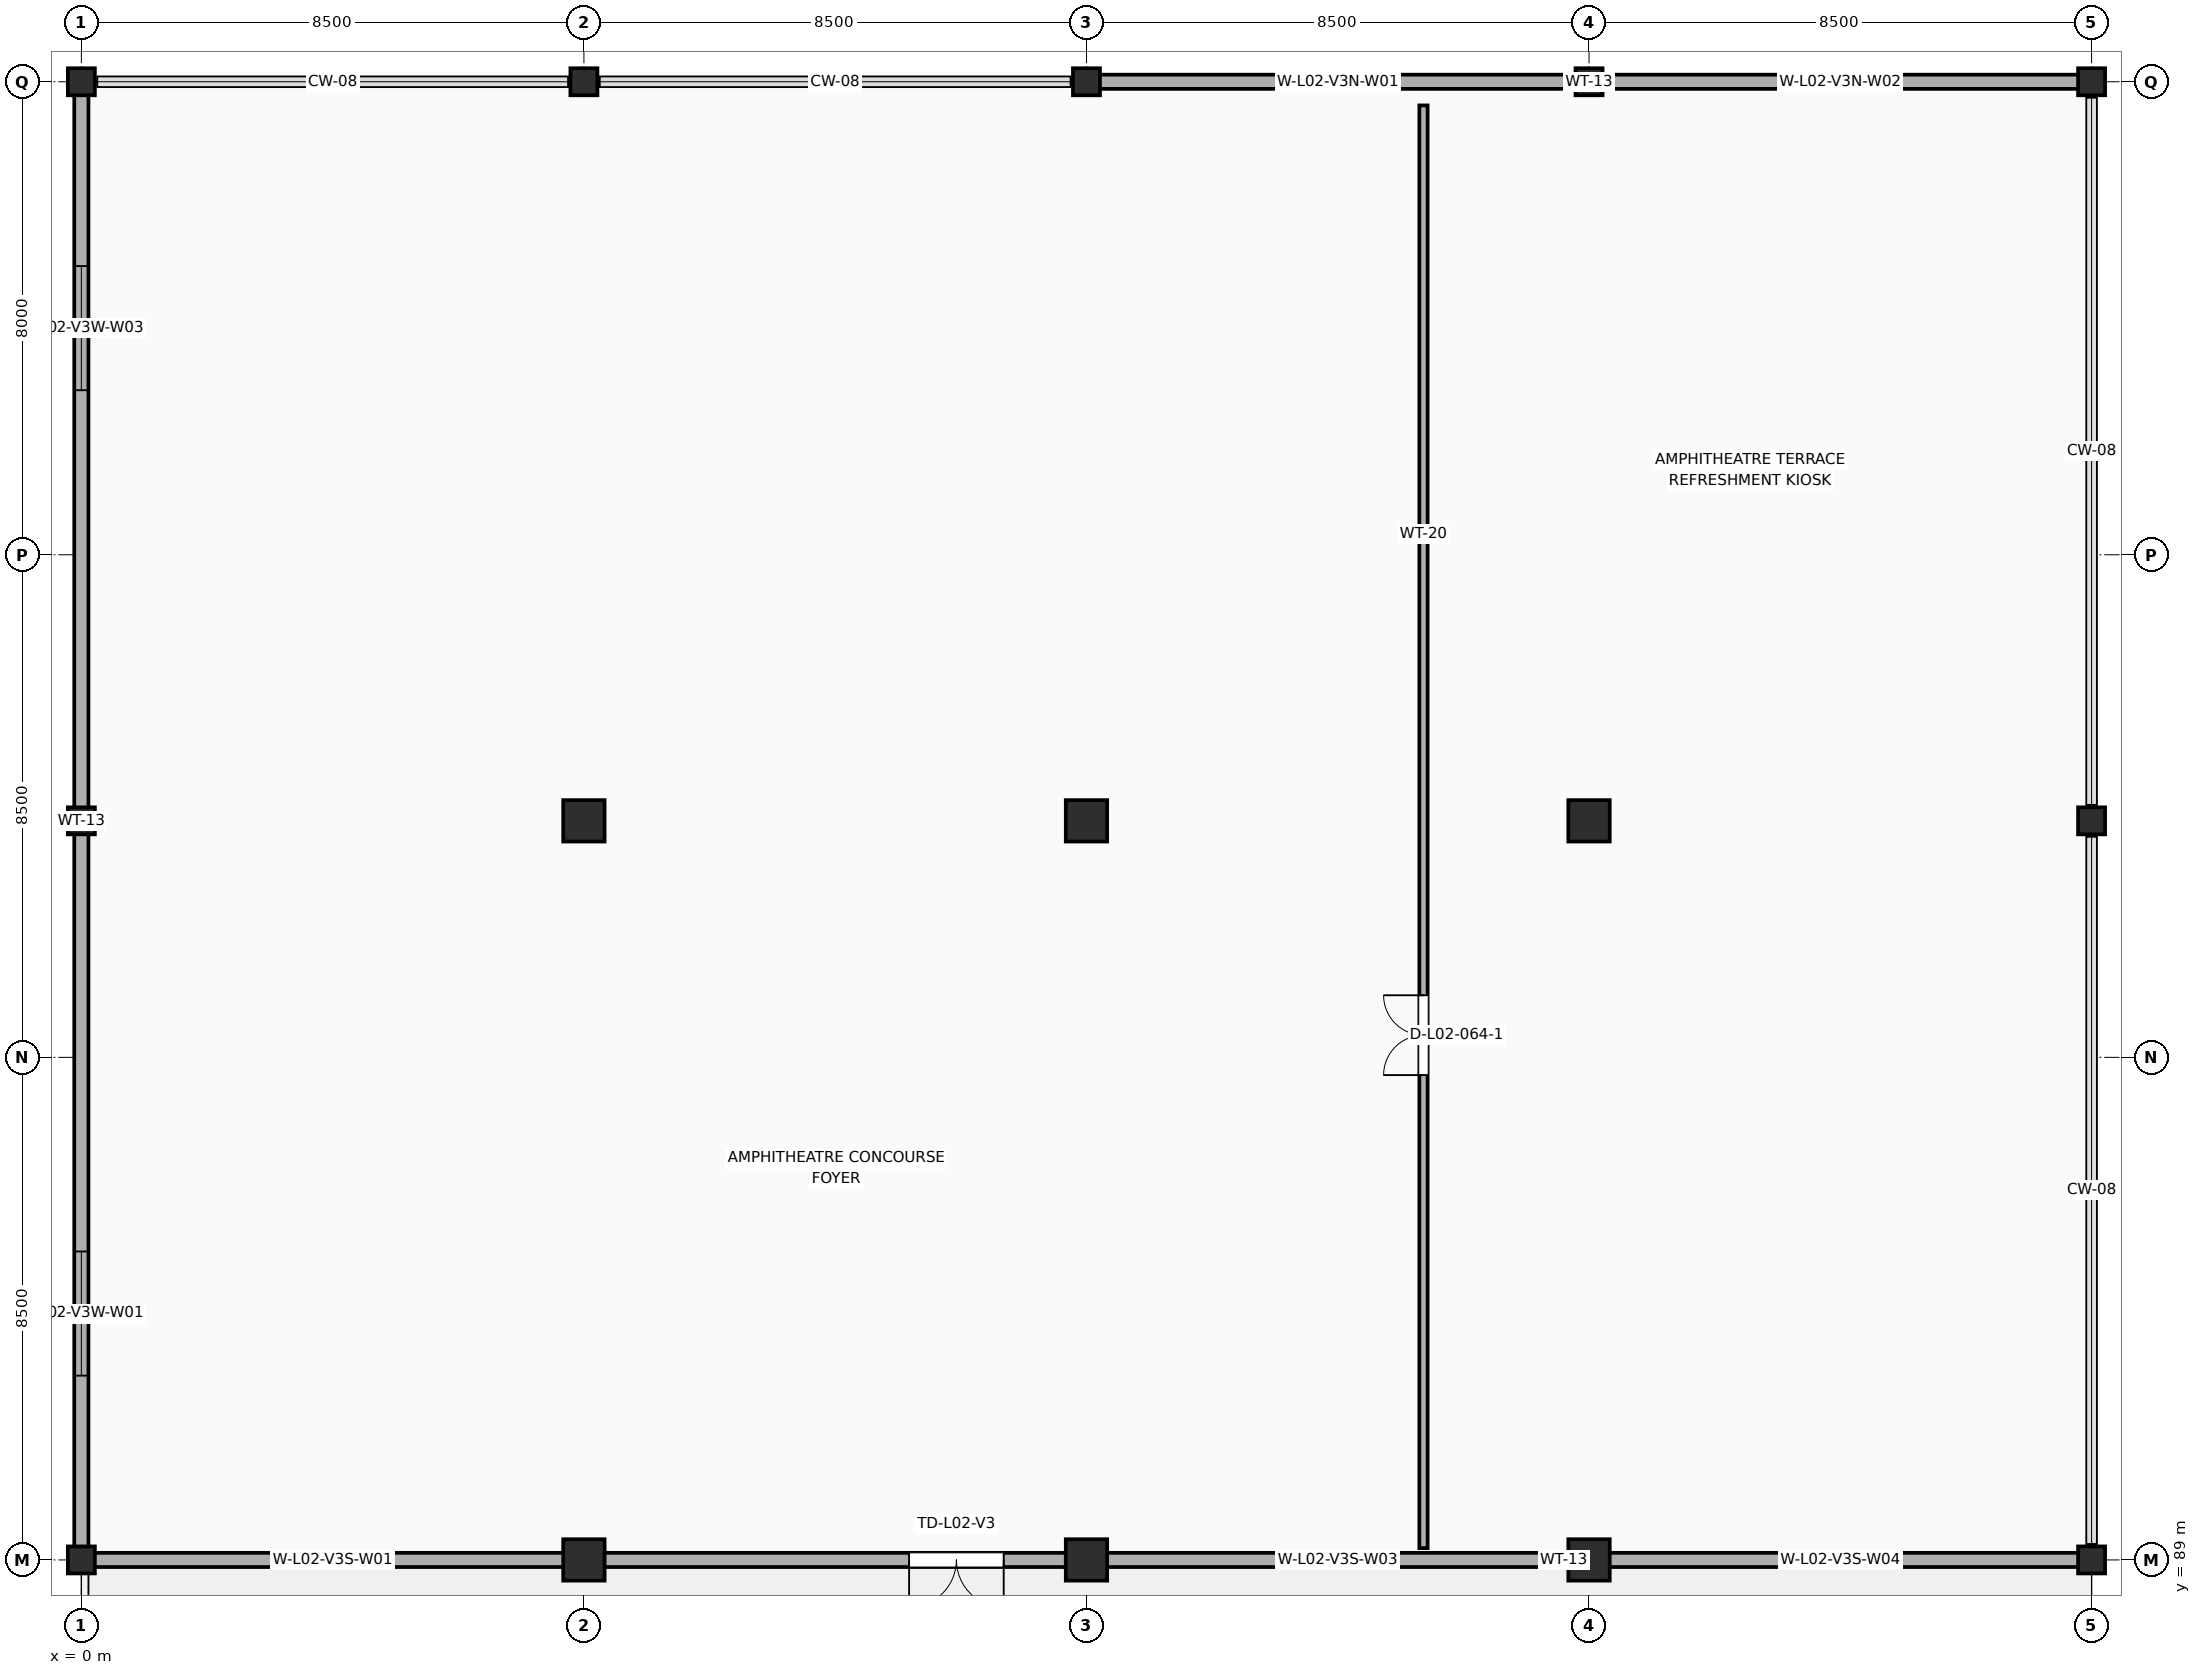
"""IFC4 building model, lengths in metres.
Left out: names, types, materials, properties, quantities, classifications, styles, units other than length and angle.
Written with IfcOpenShell. Run it as: python <this file> out.ifc"""

import sys

from ifc_helpers import new_model, si_unit, direction, frame, frame_2d, origin, origin_2d, place, context, subcontext, project, spatial, rectangle, hollow_circle, extrude, element, fill, save


model = new_model("IFC4")
c1 = context("Model", 3, precision=1e-05, world=origin(), true_north=direction((0.0, 1.0)))
c2 = subcontext(c1, "Body", "Model", "MODEL_VIEW")
j1 = project(units=[si_unit("LENGTHUNIT", "METRE"), si_unit("PLANEANGLEUNIT", "RADIAN")], contexts=[c1])
p1 = place(None, origin())
s1 = spatial("IfcSite", under=j1, at=p1, CompositionType="ELEMENT")
p2 = place(p1, origin())
s2 = spatial("IfcBuilding", under=s1, at=p2, CompositionType="ELEMENT")
p3 = place(p2, frame((0.0, 0.0, 10.2)))
s3 = spatial("IfcBuildingStorey", under=s2, at=p3, CompositionType="ELEMENT", Elevation=10.2)
for number, where, z_axis, x_axis in (
    (1, (0.0, 89.0, 0.0), (0.0, 0.0, 1.0), (1.0, 0.0, 0.0)),
    (2, (0.0, 101.5, 0.0), (0.0, 0.0, 1.0), (1.0, 0.0, 0.0)),
    (3, (0.0, 114.0, 0.0), (0.0, 0.0, 1.0), (1.0, 0.0, 0.0)),
):
    element("IfcColumn", number, at=place(p3, frame(where, z_axis=z_axis, x_axis=x_axis)), inside=s3, PredefinedType="COLUMN", context=c2, shape_type="SweptSolid", body=[
        extrude(hollow_circle(Radius=0.229, WallThickness=0.016, at=origin_2d()), origin(), (0.0, 0.0, 1.0), 4.53),
    ])
for number, where, z_axis, x_axis in (
    (4, (8.5, 89.0, 0.0), (0.0, 0.0, 1.0), (1.0, 0.0, 0.0)),
    (5, (8.5, 101.5, 0.0), (0.0, 0.0, 1.0), (1.0, 0.0, 0.0)),
):
    element("IfcColumn", number, at=place(p3, frame(where, z_axis=z_axis, x_axis=x_axis)), inside=s3, PredefinedType="COLUMN", context=c2, shape_type="SweptSolid", body=[
        extrude(rectangle(XDim=0.7, YDim=0.7, at=origin_2d()), origin(), (0.0, 0.0, 1.0), 4.53),
    ])
p4 = place(p3, frame((8.5, 114.0, 0.0), z_axis=(0.0, 0.0, 1.0), x_axis=(1.0, 0.0, 0.0)))
e6 = element("IfcColumn", 6, at=p4, inside=s3, PredefinedType="COLUMN", context=c2, shape_type="SweptSolid", body=[
    extrude(hollow_circle(Radius=0.229, WallThickness=0.016, at=origin_2d()), origin(), (0.0, 0.0, 1.0), 4.53),
])
for number, where, z_axis, x_axis in (
    (7, (17.0, 89.0, 0.0), (0.0, 0.0, 1.0), (1.0, 0.0, 0.0)),
    (8, (17.0, 101.5, 0.0), (0.0, 0.0, 1.0), (1.0, 0.0, 0.0)),
):
    element("IfcColumn", number, at=place(p3, frame(where, z_axis=z_axis, x_axis=x_axis)), inside=s3, PredefinedType="COLUMN", context=c2, shape_type="SweptSolid", body=[
        extrude(rectangle(XDim=0.7, YDim=0.7, at=origin_2d()), origin(), (0.0, 0.0, 1.0), 4.53),
    ])
p5 = place(p3, frame((17.0, 114.0, 0.0), z_axis=(0.0, 0.0, 1.0), x_axis=(1.0, 0.0, 0.0)))
e9 = element("IfcColumn", 9, at=p5, inside=s3, PredefinedType="COLUMN", context=c2, shape_type="SweptSolid", body=[
    extrude(hollow_circle(Radius=0.229, WallThickness=0.016, at=origin_2d()), origin(), (0.0, 0.0, 1.0), 4.53),
])
for number, where, z_axis, x_axis in (
    (10, (25.5, 89.0, 0.0), (0.0, 0.0, 1.0), (1.0, 0.0, 0.0)),
    (11, (25.5, 101.5, 0.0), (0.0, 0.0, 1.0), (1.0, 0.0, 0.0)),
):
    element("IfcColumn", number, at=place(p3, frame(where, z_axis=z_axis, x_axis=x_axis)), inside=s3, PredefinedType="COLUMN", context=c2, shape_type="SweptSolid", body=[
        extrude(rectangle(XDim=0.7, YDim=0.7, at=origin_2d()), origin(), (0.0, 0.0, 1.0), 4.53),
    ])
for number, where, z_axis, x_axis in (
    (12, (25.5, 114.0, 0.0), (0.0, 0.0, 1.0), (1.0, 0.0, 0.0)),
    (13, (34.0, 89.0, 0.0), (0.0, 0.0, 1.0), (1.0, 0.0, 0.0)),
    (14, (34.0, 101.5, 0.0), (0.0, 0.0, 1.0), (1.0, 0.0, 0.0)),
    (15, (34.0, 114.0, 0.0), (0.0, 0.0, 1.0), (1.0, 0.0, 0.0)),
):
    element("IfcColumn", number, at=place(p3, frame(where, z_axis=z_axis, x_axis=x_axis)), inside=s3, PredefinedType="COLUMN", context=c2, shape_type="SweptSolid", body=[
        extrude(hollow_circle(Radius=0.229, WallThickness=0.016, at=origin_2d()), origin(), (0.0, 0.0, 1.0), 4.53),
    ])
p6 = place(p3, frame((0.0, 89.0, 0.0), z_axis=(0.0, 0.0, 1.0), x_axis=(0.0, 1.0, 0.0)))
e16 = element("IfcWall", 16, at=p6, inside=s3, PredefinedType="STANDARD", context=c2, shape_type="SweptSolid", body=[
    extrude(rectangle(XDim=25.0, YDim=0.24, at=frame_2d((12.5, 0.0))), origin(), (0.0, 0.0, 1.0), 4.198),
])
p7 = place(p6, frame((3.117, 0.0, 0.9)))
e17 = element("IfcOpeningElement", 17, at=p7, cuts=e16, PredefinedType="OPENING", context=c2, shape_type="SweptSolid", body=[
    extrude(rectangle(XDim=2.1, YDim=1.8, at=frame_2d((1.05, 0.9))), frame((0.0, 0.132, 0.0), z_axis=(0.0, -1.0, 0.0), x_axis=(1.0, 0.0, 0.0)), (0.0, 0.0, 1.0), 0.264),
])
p8 = place(p6, frame((19.783, 0.0, 0.9)))
e18 = element("IfcOpeningElement", 18, at=p8, cuts=e16, PredefinedType="OPENING", context=c2, shape_type="SweptSolid", body=[
    extrude(rectangle(XDim=2.1, YDim=1.8, at=frame_2d((1.05, 0.9))), frame((0.0, 0.132, 0.0), z_axis=(0.0, -1.0, 0.0), x_axis=(1.0, 0.0, 0.0)), (0.0, 0.0, 1.0), 0.264),
])
p9 = place(p3, frame((17.0, 114.0, 0.0), z_axis=(0.0, 0.0, 1.0), x_axis=(1.0, 0.0, 0.0)))
e19 = element("IfcWall", 19, at=p9, inside=s3, PredefinedType="STANDARD", context=c2, shape_type="SweptSolid", body=[
    extrude(rectangle(XDim=17.0, YDim=0.24, at=frame_2d((8.5, 0.0))), origin(), (0.0, 0.0, 1.0), 4.168),
])
p10 = place(p9, frame((3.35, 0.0, 0.9)))
e20 = element("IfcOpeningElement", 20, at=p10, cuts=e19, PredefinedType="OPENING", context=c2, shape_type="SweptSolid", body=[
    extrude(rectangle(XDim=1.8, YDim=1.8, at=frame_2d((0.9, 0.9))), frame((0.0, 0.132, 0.0), z_axis=(0.0, -1.0, 0.0), x_axis=(1.0, 0.0, 0.0)), (0.0, 0.0, 1.0), 0.264),
])
p11 = place(p9, frame((11.85, 0.0, 0.9)))
e21 = element("IfcOpeningElement", 21, at=p11, cuts=e19, PredefinedType="OPENING", context=c2, shape_type="SweptSolid", body=[
    extrude(rectangle(XDim=1.8, YDim=1.8, at=frame_2d((0.9, 0.9))), frame((0.0, 0.132, 0.0), z_axis=(0.0, -1.0, 0.0), x_axis=(1.0, 0.0, 0.0)), (0.0, 0.0, 1.0), 0.264),
])
p12 = place(p3, frame((0.0, 89.0, 0.0), z_axis=(0.0, 0.0, 1.0), x_axis=(1.0, 0.0, 0.0)))
e22 = element("IfcWall", 22, at=p12, inside=s3, PredefinedType="STANDARD", context=c2, shape_type="SweptSolid", body=[
    extrude(rectangle(XDim=34.0, YDim=0.24, at=frame_2d((17.0, 0.0))), origin(), (0.0, 0.0, 1.0), 3.93),
])
p13 = place(p12, frame((14.0, 0.0, 0.0)))
e23 = element("IfcOpeningElement", 23, at=p13, cuts=e22, PredefinedType="OPENING", context=c2, shape_type="SweptSolid", body=[
    extrude(rectangle(XDim=1.6, YDim=2.3, at=frame_2d((0.8, 1.15))), frame((0.0, 0.132, 0.0), z_axis=(0.0, -1.0, 0.0), x_axis=(1.0, 0.0, 0.0)), (0.0, 0.0, 1.0), 0.264),
])
p14 = place(p12, frame((3.25, 0.0, 0.9)))
e24 = element("IfcOpeningElement", 24, at=p14, cuts=e22, PredefinedType="OPENING", context=c2, shape_type="SweptSolid", body=[
    extrude(rectangle(XDim=2.0, YDim=2.2, at=frame_2d((1.0, 1.1))), frame((0.0, 0.132, 0.0), z_axis=(0.0, -1.0, 0.0), x_axis=(1.0, 0.0, 0.0)), (0.0, 0.0, 1.0), 0.264),
])
p15 = place(p12, frame((20.25, 0.0, 0.9)))
e25 = element("IfcOpeningElement", 25, at=p15, cuts=e22, PredefinedType="OPENING", context=c2, shape_type="SweptSolid", body=[
    extrude(rectangle(XDim=2.0, YDim=2.2, at=frame_2d((1.0, 1.1))), frame((0.0, 0.132, 0.0), z_axis=(0.0, -1.0, 0.0), x_axis=(1.0, 0.0, 0.0)), (0.0, 0.0, 1.0), 0.264),
])
p16 = place(p12, frame((28.75, 0.0, 0.9)))
e26 = element("IfcOpeningElement", 26, at=p16, cuts=e22, PredefinedType="OPENING", context=c2, shape_type="SweptSolid", body=[
    extrude(rectangle(XDim=2.0, YDim=2.2, at=frame_2d((1.0, 1.1))), frame((0.0, 0.132, 0.0), z_axis=(0.0, -1.0, 0.0), x_axis=(1.0, 0.0, 0.0)), (0.0, 0.0, 1.0), 0.264),
])
p17 = place(p3, frame((22.7, 89.2, 0.0), z_axis=(0.0, 0.0, 1.0), x_axis=(0.0, 1.0, 0.0)))
e27 = element("IfcWall", 27, at=p17, inside=s3, PredefinedType="PARTITIONING", context=c2, shape_type="SweptSolid", body=[
    extrude(rectangle(XDim=24.4, YDim=0.14, at=frame_2d((12.2, 0.0))), origin(), (0.0, 0.0, 1.0), 4.022),
])
p18 = place(p17, frame((8.0, 0.0, 0.0)))
e28 = element("IfcOpeningElement", 28, at=p18, cuts=e27, PredefinedType="OPENING", context=c2, shape_type="SweptSolid", body=[
    extrude(rectangle(XDim=1.35, YDim=2.25, at=frame_2d((0.675, 1.125))), frame((0.0, 0.082, 0.0), z_axis=(0.0, -1.0, 0.0), x_axis=(1.0, 0.0, 0.0)), (0.0, 0.0, 1.0), 0.164),
])
p19 = place(p7, origin())
e29 = element("IfcWindow", 29, at=p19, inside=s3, PartitioningType="SINGLE_PANEL", PredefinedType="WINDOW", context=c2, shape_type="SweptSolid", body=[
    extrude(rectangle(XDim=2.1, YDim=1.8, at=frame_2d((1.05, 0.9))), frame((0.0, 0.03, 0.0), z_axis=(0.0, -1.0, 0.0), x_axis=(1.0, 0.0, 0.0)), (0.0, 0.0, 1.0), 0.06),
])
fill(e17, e29)
p20 = place(p8, origin())
e30 = element("IfcWindow", 30, at=p20, inside=s3, PartitioningType="SINGLE_PANEL", PredefinedType="WINDOW", context=c2, shape_type="SweptSolid", body=[
    extrude(rectangle(XDim=2.1, YDim=1.8, at=frame_2d((1.05, 0.9))), frame((0.0, 0.03, 0.0), z_axis=(0.0, -1.0, 0.0), x_axis=(1.0, 0.0, 0.0)), (0.0, 0.0, 1.0), 0.06),
])
fill(e18, e30)
p21 = place(p10, origin())
e31 = element("IfcWindow", 31, at=p21, inside=s3, PartitioningType="SINGLE_PANEL", PredefinedType="WINDOW", context=c2, shape_type="SweptSolid", body=[
    extrude(rectangle(XDim=1.8, YDim=1.8, at=frame_2d((0.9, 0.9))), frame((0.0, 0.03, 0.0), z_axis=(0.0, -1.0, 0.0), x_axis=(1.0, 0.0, 0.0)), (0.0, 0.0, 1.0), 0.06),
])
fill(e20, e31)
p22 = place(p11, origin())
e32 = element("IfcWindow", 32, at=p22, inside=s3, PartitioningType="SINGLE_PANEL", PredefinedType="WINDOW", context=c2, shape_type="SweptSolid", body=[
    extrude(rectangle(XDim=1.8, YDim=1.8, at=frame_2d((0.9, 0.9))), frame((0.0, 0.03, 0.0), z_axis=(0.0, -1.0, 0.0), x_axis=(1.0, 0.0, 0.0)), (0.0, 0.0, 1.0), 0.06),
])
fill(e21, e32)
p23 = place(p13, frame((1.6, 0.0, 0.0), z_axis=(0.0, 0.0, 1.0), x_axis=(-1.0, 0.0, 0.0)))
e33 = element("IfcDoor", 33, at=p23, inside=s3, OperationType="DOUBLE_DOOR_SINGLE_SWING", PredefinedType="DOOR", context=c2, shape_type="SweptSolid", body=[
    extrude(rectangle(XDim=1.6, YDim=2.3, at=frame_2d((0.8, 1.15))), frame((0.0, 0.025, 0.0), z_axis=(0.0, -1.0, 0.0), x_axis=(1.0, 0.0, 0.0)), (0.0, 0.0, 1.0), 0.05),
])
fill(e23, e33)
p24 = place(p14, origin())
e34 = element("IfcWindow", 34, at=p24, inside=s3, PartitioningType="SINGLE_PANEL", PredefinedType="WINDOW", context=c2, shape_type="SweptSolid", body=[
    extrude(rectangle(XDim=2.0, YDim=2.2, at=frame_2d((1.0, 1.1))), frame((0.0, 0.03, 0.0), z_axis=(0.0, -1.0, 0.0), x_axis=(1.0, 0.0, 0.0)), (0.0, 0.0, 1.0), 0.06),
])
fill(e24, e34)
p25 = place(p15, origin())
e35 = element("IfcWindow", 35, at=p25, inside=s3, PartitioningType="SINGLE_PANEL", PredefinedType="WINDOW", context=c2, shape_type="SweptSolid", body=[
    extrude(rectangle(XDim=2.0, YDim=2.2, at=frame_2d((1.0, 1.1))), frame((0.0, 0.03, 0.0), z_axis=(0.0, -1.0, 0.0), x_axis=(1.0, 0.0, 0.0)), (0.0, 0.0, 1.0), 0.06),
])
fill(e25, e35)
p26 = place(p16, origin())
e36 = element("IfcWindow", 36, at=p26, inside=s3, PartitioningType="SINGLE_PANEL", PredefinedType="WINDOW", context=c2, shape_type="SweptSolid", body=[
    extrude(rectangle(XDim=2.0, YDim=2.2, at=frame_2d((1.0, 1.1))), frame((0.0, 0.03, 0.0), z_axis=(0.0, -1.0, 0.0), x_axis=(1.0, 0.0, 0.0)), (0.0, 0.0, 1.0), 0.06),
])
fill(e26, e36)
p27 = place(p18, origin())
e37 = element("IfcDoor", 37, at=p27, inside=s3, OperationType="DOUBLE_DOOR_SINGLE_SWING", PredefinedType="DOOR", context=c2, shape_type="SweptSolid", body=[
    extrude(rectangle(XDim=1.35, YDim=2.25, at=frame_2d((0.675, 1.125))), frame((0.0, 0.025, 0.0), z_axis=(0.0, -1.0, 0.0), x_axis=(1.0, 0.0, 0.0)), (0.0, 0.0, 1.0), 0.05),
])
fill(e28, e37)
save(model, sys.argv[1])
